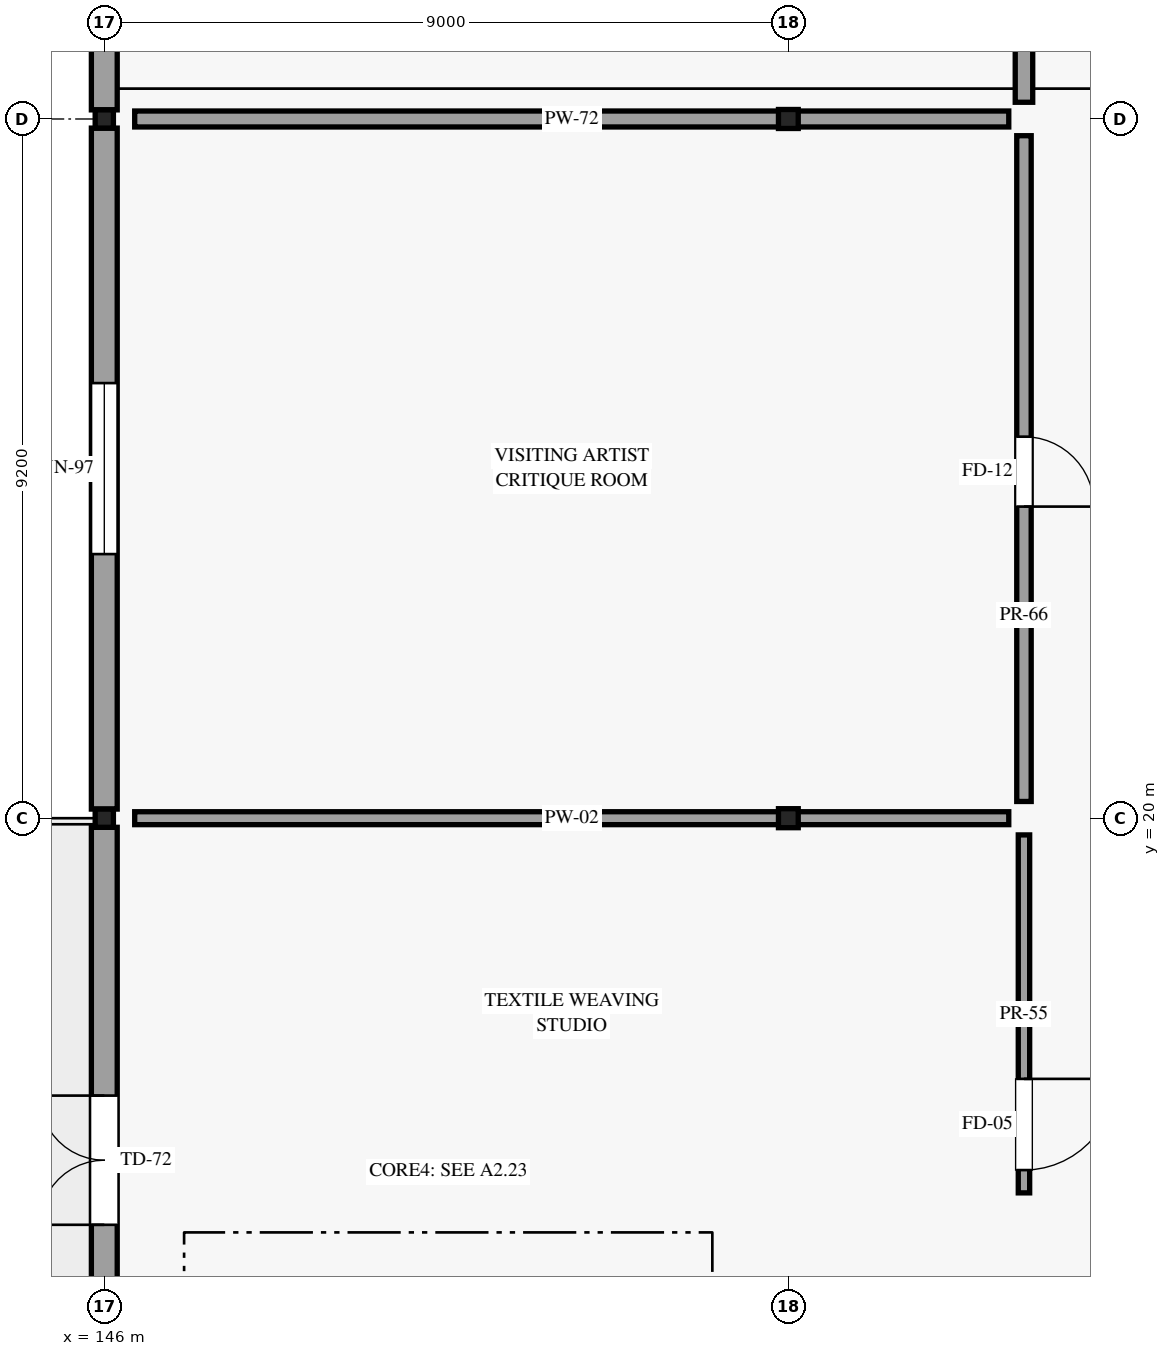
"""IFC4 building model, lengths in metres.
Left out: names, types, materials, properties, quantities, classifications, styles, units other than length and angle.
Written with IfcOpenShell. Run it as: python <this file> out.ifc"""

import sys

from ifc_helpers import new_model, si_unit, direction, frame, frame_2d, origin, origin_2d, place, context, subcontext, project, spatial, rectangle, i_section, extrude, element, fill, save


model = new_model("IFC4")
c1 = context("Model", 3, precision=1e-05, world=origin(), true_north=direction((0.0, 1.0)))
c2 = subcontext(c1, "Body", "Model", "MODEL_VIEW")
j1 = project(units=[si_unit("LENGTHUNIT", "METRE"), si_unit("PLANEANGLEUNIT", "RADIAN")], contexts=[c1])
p1 = place(None, origin())
s1 = spatial("IfcSite", under=j1, at=p1, CompositionType="ELEMENT")
p2 = place(p1, origin())
s2 = spatial("IfcBuilding", under=s1, at=p2, CompositionType="ELEMENT")
p3 = place(p2, frame((0.0, 0.0, 15.0)))
s3 = spatial("IfcBuildingStorey", under=s2, at=p3, CompositionType="ELEMENT", Elevation=15.0)
for number, where, z_axis, x_axis in (
    (1, (146.0, 20.0, 0.0), (0.0, 0.0, 1.0), (1.0, 0.0, 0.0)),
    (2, (146.0, 29.2, 0.0), (0.0, 0.0, 1.0), (1.0, 0.0, 0.0)),
):
    element("IfcColumn", number, at=place(p3, frame(where, z_axis=z_axis, x_axis=x_axis)), inside=s3, PredefinedType="COLUMN", context=c2, shape_type="SweptSolid", body=[
        extrude(i_section(OverallWidth=0.24, OverallDepth=0.24, WebThickness=0.01, FlangeThickness=0.017, FilletRadius=0.021, at=origin_2d()), origin(), (0.0, 0.0, 1.0), 4.5),
    ])
for number, where, z_axis, x_axis in (
    (3, (155.0, 20.0, 0.0), (0.0, 0.0, 1.0), (1.0, 0.0, 0.0)),
    (4, (155.0, 29.2, 0.0), (0.0, 0.0, 1.0), (1.0, 0.0, 0.0)),
):
    element("IfcColumn", number, at=place(p3, frame(where, z_axis=z_axis, x_axis=x_axis)), inside=s3, PredefinedType="COLUMN", context=c2, shape_type="SweptSolid", body=[
        extrude(i_section(OverallWidth=0.26, OverallDepth=0.25, WebThickness=0.008, FlangeThickness=0.012, FilletRadius=0.024, at=origin_2d()), origin(), (0.0, 0.0, 1.0), 4.5),
    ])
p4 = place(p3, frame((146.0, 11.12, 0.0), z_axis=(0.0, 0.0, 1.0), x_axis=(0.0, 1.0, 0.0)))
e5 = element("IfcWall", 5, at=p4, inside=s3, PredefinedType="STANDARD", context=c2, shape_type="SweptSolid", body=[
    extrude(rectangle(XDim=8.76, YDim=0.34, at=frame_2d((4.38, 0.0))), origin(), (0.0, 0.0, 1.0), 3.855),
])
p5 = place(p4, frame((3.53, 0.0, 0.0)))
e6 = element("IfcOpeningElement", 6, at=p5, cuts=e5, PredefinedType="OPENING", context=c2, shape_type="SweptSolid", body=[
    extrude(rectangle(XDim=1.7, YDim=2.35, at=frame_2d((0.85, 1.175))), frame((0.0, 0.18, 0.0), z_axis=(0.0, -1.0, 0.0), x_axis=(1.0, 0.0, 0.0)), (0.0, 0.0, 1.0), 0.36),
])
p6 = place(p3, frame((146.0, 20.12, 0.0), z_axis=(0.0, 0.0, 1.0), x_axis=(0.0, 1.0, 0.0)))
e7 = element("IfcWall", 7, at=p6, inside=s3, PredefinedType="STANDARD", context=c2, shape_type="SweptSolid", body=[
    extrude(rectangle(XDim=8.96, YDim=0.34, at=frame_2d((4.48, 0.0))), origin(), (0.0, 0.0, 1.0), 3.855),
])
p7 = place(p6, frame((3.355, 0.0, 0.85)))
e8 = element("IfcOpeningElement", 8, at=p7, cuts=e7, PredefinedType="OPENING", context=c2, shape_type="SweptSolid", body=[
    extrude(rectangle(XDim=2.25, YDim=2.3, at=frame_2d((1.125, 1.15))), frame((0.0, 0.18, 0.0), z_axis=(0.0, -1.0, 0.0), x_axis=(1.0, 0.0, 0.0)), (0.0, 0.0, 1.0), 0.36),
])
p8 = place(p3, frame((146.0, 29.32, 0.0), z_axis=(0.0, 0.0, 1.0), x_axis=(0.0, 1.0, 0.0)))
e9 = element("IfcWall", 9, at=p8, inside=s3, PredefinedType="STANDARD", context=c2, shape_type="SweptSolid", body=[
    extrude(rectangle(XDim=8.96, YDim=0.34, at=frame_2d((4.48, 0.0))), origin(), (0.0, 0.0, 1.0), 3.855),
])
p9 = place(p8, frame((3.255, 0.0, 0.85)))
e10 = element("IfcOpeningElement", 10, at=p9, cuts=e9, PredefinedType="OPENING", context=c2, shape_type="SweptSolid", body=[
    extrude(rectangle(XDim=2.45, YDim=2.4, at=frame_2d((1.225, 1.2))), frame((0.0, 0.18, 0.0), z_axis=(0.0, -1.0, 0.0), x_axis=(1.0, 0.0, 0.0)), (0.0, 0.0, 1.0), 0.36),
])
p10 = place(p3, frame((158.1, 15.07, 0.0), z_axis=(0.0, 0.0, 1.0), x_axis=(0.0, 1.0, 0.0)))
e11 = element("IfcWall", 11, at=p10, inside=s3, PredefinedType="PARTITIONING", context=c2, shape_type="SweptSolid", body=[
    extrude(rectangle(XDim=4.71, YDim=0.15, at=frame_2d((2.355, 0.0))), origin(), (0.0, 0.0, 1.0), 3.855),
])
p11 = place(p10, frame((1.5, 0.0, 0.0), z_axis=(0.0, 0.0, 1.0), x_axis=(-1.0, 0.0, 0.0)))
e12 = element("IfcOpeningElement", 12, at=p11, cuts=e11, PredefinedType="OPENING", context=c2, shape_type="SweptSolid", body=[
    extrude(rectangle(XDim=1.2, YDim=2.3, at=frame_2d((0.6, 1.15))), frame((0.0, 0.085, 0.0), z_axis=(0.0, -1.0, 0.0), x_axis=(1.0, 0.0, 0.0)), (0.0, 0.0, 1.0), 0.17),
])
p12 = place(p3, frame((146.4, 20.0, 0.0), z_axis=(0.0, 0.0, 1.0), x_axis=(1.0, 0.0, 0.0)))
e13 = element("IfcWall", 13, at=p12, inside=s3, PredefinedType="PARTITIONING", context=c2, shape_type="SweptSolid", body=[
    extrude(rectangle(XDim=11.5, YDim=0.17, at=frame_2d((5.75, 0.0))), origin(), (0.0, 0.0, 1.0), 3.855),
])
p13 = place(p3, frame((158.1, 20.22, 0.0), z_axis=(0.0, 0.0, 1.0), x_axis=(0.0, 1.0, 0.0)))
e14 = element("IfcWall", 14, at=p13, inside=s3, PredefinedType="PARTITIONING", context=c2, shape_type="SweptSolid", body=[
    extrude(rectangle(XDim=8.76, YDim=0.19, at=frame_2d((4.38, 0.0))), origin(), (0.0, 0.0, 1.0), 3.855),
])
p14 = place(p13, frame((4.8, 0.0, 0.0), z_axis=(0.0, 0.0, 1.0), x_axis=(-1.0, 0.0, 0.0)))
e15 = element("IfcOpeningElement", 15, at=p14, cuts=e14, PredefinedType="OPENING", context=c2, shape_type="SweptSolid", body=[
    extrude(rectangle(XDim=0.92, YDim=2.12, at=frame_2d((0.46, 1.06))), frame((0.0, 0.105, 0.0), z_axis=(0.0, -1.0, 0.0), x_axis=(1.0, 0.0, 0.0)), (0.0, 0.0, 1.0), 0.21),
])
p15 = place(p3, frame((146.4, 29.2, 0.0), z_axis=(0.0, 0.0, 1.0), x_axis=(1.0, 0.0, 0.0)))
e16 = element("IfcWall", 16, at=p15, inside=s3, PredefinedType="PARTITIONING", context=c2, shape_type="SweptSolid", body=[
    extrude(rectangle(XDim=11.5, YDim=0.21, at=frame_2d((5.75, 0.0))), origin(), (0.0, 0.0, 1.0), 3.855),
])
p16 = place(p3, frame((158.1, 29.42, 0.0), z_axis=(0.0, 0.0, 1.0), x_axis=(0.0, 1.0, 0.0)))
e17 = element("IfcWall", 17, at=p16, inside=s3, PredefinedType="PARTITIONING", context=c2, shape_type="SweptSolid", body=[
    extrude(rectangle(XDim=17.64, YDim=0.23, at=frame_2d((8.82, 0.0))), origin(), (0.0, 0.0, 1.0), 3.855),
])
p17 = place(p16, frame((4.889, 0.0, 0.0), z_axis=(0.0, 0.0, 1.0), x_axis=(-1.0, 0.0, 0.0)))
e18 = element("IfcOpeningElement", 18, at=p17, cuts=e17, PredefinedType="OPENING", context=c2, shape_type="SweptSolid", body=[
    extrude(rectangle(XDim=0.98, YDim=2.18, at=frame_2d((0.49, 1.09))), frame((0.0, 0.125, 0.0), z_axis=(0.0, -1.0, 0.0), x_axis=(1.0, 0.0, 0.0)), (0.0, 0.0, 1.0), 0.25),
])
p18 = place(p5, origin())
e19 = element("IfcDoor", 19, at=p18, inside=s3, OperationType="DOUBLE_DOOR_SINGLE_SWING", PredefinedType="DOOR", context=c2, shape_type="SweptSolid", body=[
    extrude(rectangle(XDim=1.7, YDim=2.35, at=frame_2d((0.85, 1.175))), frame((0.0, 0.025, 0.0), z_axis=(0.0, -1.0, 0.0), x_axis=(1.0, 0.0, 0.0)), (0.0, 0.0, 1.0), 0.05),
])
fill(e6, e19)
p19 = place(p7, origin())
e20 = element("IfcWindow", 20, at=p19, inside=s3, PartitioningType="SINGLE_PANEL", PredefinedType="WINDOW", context=c2, shape_type="SweptSolid", body=[
    extrude(rectangle(XDim=2.25, YDim=2.3, at=frame_2d((1.125, 1.15))), frame((0.0, 0.03, 0.0), z_axis=(0.0, -1.0, 0.0), x_axis=(1.0, 0.0, 0.0)), (0.0, 0.0, 1.0), 0.06),
])
fill(e8, e20)
p20 = place(p11, origin())
e21 = element("IfcDoor", 21, at=p20, inside=s3, OperationType="SINGLE_SWING_LEFT", PredefinedType="DOOR", context=c2, shape_type="SweptSolid", body=[
    extrude(rectangle(XDim=1.2, YDim=2.3, at=frame_2d((0.6, 1.15))), frame((0.0, 0.025, 0.0), z_axis=(0.0, -1.0, 0.0), x_axis=(1.0, 0.0, 0.0)), (0.0, 0.0, 1.0), 0.05),
])
fill(e12, e21)
p21 = place(p14, origin())
e22 = element("IfcDoor", 22, at=p21, inside=s3, OperationType="SINGLE_SWING_RIGHT", PredefinedType="DOOR", context=c2, shape_type="SweptSolid", body=[
    extrude(rectangle(XDim=0.92, YDim=2.12, at=frame_2d((0.46, 1.06))), frame((0.0, 0.025, 0.0), z_axis=(0.0, -1.0, 0.0), x_axis=(1.0, 0.0, 0.0)), (0.0, 0.0, 1.0), 0.05),
])
fill(e15, e22)
save(model, sys.argv[1])
